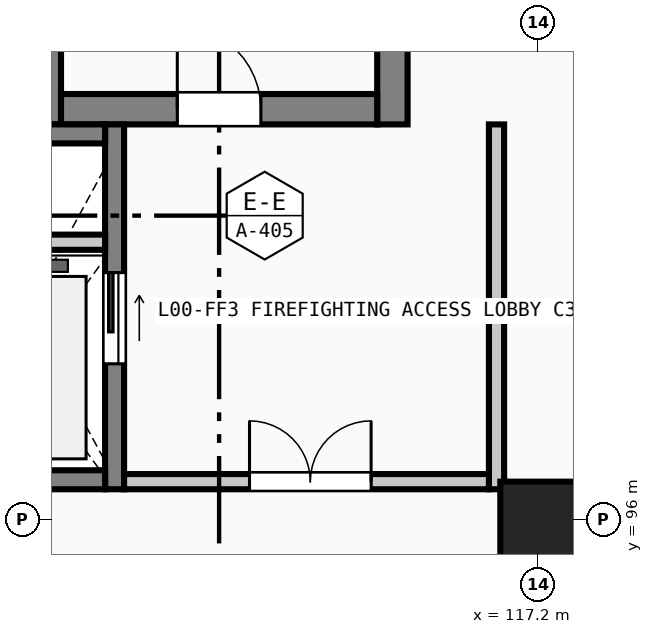
"""IFC4 building model, lengths in metres.
Left out: names, types, materials, properties, quantities, classifications, styles, units other than length and angle.
Written with IfcOpenShell. Run it as: python <this file> out.ifc"""

import sys

from ifc_helpers import new_model, si_unit, direction, frame, frame_2d, origin, origin_2d, place, context, subcontext, project, spatial, rectangle, extrude, element, fill, save


model = new_model("IFC4")
c1 = context("Model", 3, precision=1e-05, world=origin(), true_north=direction((0.0, 1.0)))
c2 = subcontext(c1, "Body", "Model", "MODEL_VIEW")
j1 = project(units=[si_unit("LENGTHUNIT", "METRE"), si_unit("PLANEANGLEUNIT", "RADIAN")], contexts=[c1])
p1 = place(None, origin())
s1 = spatial("IfcSite", under=j1, at=p1, CompositionType="ELEMENT")
p2 = place(p1, origin())
s2 = spatial("IfcBuilding", under=s1, at=p2, CompositionType="ELEMENT")
p3 = place(p2, origin())
s3 = spatial("IfcBuildingStorey", under=s2, at=p3, CompositionType="ELEMENT", Elevation=0.0)
p4 = place(p3, frame((117.2, 96.0, 0.0), z_axis=(0.0, 0.0, 1.0), x_axis=(1.0, 0.0, 0.0)))
e1 = element("IfcColumn", 1, at=p4, inside=s3, PredefinedType="COLUMN", context=c2, shape_type="SweptSolid", body=[
    extrude(rectangle(XDim=1.0, YDim=1.0, at=origin_2d()), origin(), (0.0, 0.0, 1.0), 4.8),
])
for number, where, z_axis, x_axis in (
    (2, (110.72, 101.2, 0.0), (0.0, 0.0, 1.0), (0.0, 1.0, 0.0)),
    (3, (115.28, 110.4, 0.0), (0.0, 0.0, 1.0), (0.0, -1.0, 0.0)),
):
    element("IfcWall", number, at=place(p3, frame(where, z_axis=z_axis, x_axis=x_axis)), inside=s3, PredefinedType="SHEAR", context=c2, shape_type="SweptSolid", body=[
        extrude(rectangle(XDim=9.2, YDim=0.4, at=frame_2d((4.6, 0.0))), origin(), (0.0, 0.0, 1.0), 4.525),
    ])
p5 = place(p3, frame((115.08, 101.4, 0.0), z_axis=(0.0, 0.0, 1.0), x_axis=(-1.0, 0.0, 0.0)))
e4 = element("IfcWall", 4, at=p5, inside=s3, PredefinedType="SHEAR", context=c2, shape_type="SweptSolid", body=[
    extrude(rectangle(XDim=4.16, YDim=0.4, at=frame_2d((2.08, 0.0))), origin(), (0.0, 0.0, 1.0), 4.525),
])
p6 = place(p5, frame((1.53, 0.0, 0.0)))
e5 = element("IfcOpeningElement", 5, at=p6, cuts=e4, PredefinedType="OPENING", context=c2, shape_type="SweptSolid", body=[
    extrude(rectangle(XDim=1.1, YDim=2.2, at=frame_2d((0.55, 1.1))), frame((0.0, 0.21, 0.0), z_axis=(0.0, -1.0, 0.0), x_axis=(1.0, 0.0, 0.0)), (0.0, 0.0, 1.0), 0.42),
])
p7 = place(p3, frame((111.625, 101.2, 0.0), z_axis=(0.0, 0.0, 1.0), x_axis=(0.0, -1.0, 0.0)))
e6 = element("IfcWall", 6, at=p7, inside=s3, PredefinedType="SOLIDWALL", context=c2, shape_type="SweptSolid", body=[
    extrude(rectangle(XDim=4.8, YDim=0.25, at=frame_2d((2.4, 0.0))), origin(), (0.0, 0.0, 1.0), 4.525),
])
p8 = place(p7, frame((1.95, 0.0, 0.0)))
e7 = element("IfcOpeningElement", 7, at=p8, cuts=e6, PredefinedType="OPENING", context=c2, shape_type="SweptSolid", body=[
    extrude(rectangle(XDim=1.2, YDim=2.2, at=frame_2d((0.6, 1.1))), frame((0.0, 0.135, 0.0), z_axis=(0.0, -1.0, 0.0), x_axis=(1.0, 0.0, 0.0)), (0.0, 0.0, 1.0), 0.27),
])
for number, where, z_axis, x_axis in (
    (8, (111.5, 96.525, 0.0), (0.0, 0.0, 1.0), (-1.0, 0.0, 0.0)),
    (9, (109.4, 101.075, 0.0), (0.0, 0.0, 1.0), (1.0, 0.0, 0.0)),
):
    element("IfcWall", number, at=place(p3, frame(where, z_axis=z_axis, x_axis=x_axis)), inside=s3, PredefinedType="SOLIDWALL", context=c2, shape_type="SweptSolid", body=[
        extrude(rectangle(XDim=2.1, YDim=0.25, at=frame_2d((1.05, 0.0))), origin(), (0.0, 0.0, 1.0), 4.525),
    ])
p9 = place(p3, frame((109.4, 99.65, 0.0), z_axis=(0.0, 0.0, 1.0), x_axis=(1.0, 0.0, 0.0)))
e10 = element("IfcWall", 10, at=p9, inside=s3, PredefinedType="SOLIDWALL", context=c2, shape_type="SweptSolid", body=[
    extrude(rectangle(XDim=2.1, YDim=0.2, at=frame_2d((1.05, 0.0))), origin(), (0.0, 0.0, 1.0), 4.525),
])
p10 = place(p3, frame((116.65, 101.2, 0.0), z_axis=(0.0, 0.0, 1.0), x_axis=(0.0, -1.0, 0.0)))
e11 = element("IfcWall", 11, at=p10, inside=s3, PredefinedType="SOLIDWALL", context=c2, shape_type="SweptSolid", body=[
    extrude(rectangle(XDim=4.8, YDim=0.2, at=frame_2d((2.4, 0.0))), origin(), (0.0, 0.0, 1.0), 4.525),
])
p11 = place(p3, frame((116.55, 96.5, 0.0), z_axis=(0.0, 0.0, 1.0), x_axis=(-1.0, 0.0, 0.0)))
e12 = element("IfcWall", 12, at=p11, inside=s3, PredefinedType="SOLIDWALL", context=c2, shape_type="SweptSolid", body=[
    extrude(rectangle(XDim=4.8, YDim=0.2, at=frame_2d((2.4, 0.0))), origin(), (0.0, 0.0, 1.0), 4.525),
])
p12 = place(p11, frame((1.55, 0.0, 0.0)))
e13 = element("IfcOpeningElement", 13, at=p12, cuts=e12, PredefinedType="OPENING", context=c2, shape_type="SweptSolid", body=[
    extrude(rectangle(XDim=1.6, YDim=2.2, at=frame_2d((0.8, 1.1))), frame((0.0, 0.11, 0.0), z_axis=(0.0, -1.0, 0.0), x_axis=(1.0, 0.0, 0.0)), (0.0, 0.0, 1.0), 0.22),
])
p13 = place(p6, frame((1.1, 0.0, 0.0), z_axis=(0.0, 0.0, 1.0), x_axis=(-1.0, 0.0, 0.0)))
e14 = element("IfcDoor", 14, at=p13, inside=s3, OperationType="SINGLE_SWING_LEFT", PredefinedType="DOOR", context=c2, shape_type="SweptSolid", body=[
    extrude(rectangle(XDim=1.1, YDim=2.2, at=frame_2d((0.55, 1.1))), frame((0.0, 0.025, 0.0), z_axis=(0.0, -1.0, 0.0), x_axis=(1.0, 0.0, 0.0)), (0.0, 0.0, 1.0), 0.05),
])
fill(e5, e14)
p14 = place(p8, origin())
e15 = element("IfcDoor", 15, at=p14, inside=s3, OperationType="SLIDING_TO_LEFT", PredefinedType="DOOR", context=c2, shape_type="SweptSolid", body=[
    extrude(rectangle(XDim=1.2, YDim=2.2, at=frame_2d((0.6, 1.1))), frame((0.0, 0.025, 0.0), z_axis=(0.0, -1.0, 0.0), x_axis=(1.0, 0.0, 0.0)), (0.0, 0.0, 1.0), 0.05),
])
fill(e7, e15)
p15 = place(p12, frame((1.6, 0.0, 0.0), z_axis=(0.0, 0.0, 1.0), x_axis=(-1.0, 0.0, 0.0)))
e16 = element("IfcDoor", 16, at=p15, inside=s3, OperationType="DOUBLE_DOOR_SINGLE_SWING", PredefinedType="DOOR", context=c2, shape_type="SweptSolid", body=[
    extrude(rectangle(XDim=1.6, YDim=2.2, at=frame_2d((0.8, 1.1))), frame((0.0, 0.025, 0.0), z_axis=(0.0, -1.0, 0.0), x_axis=(1.0, 0.0, 0.0)), (0.0, 0.0, 1.0), 0.05),
])
fill(e13, e16)
save(model, sys.argv[1])
